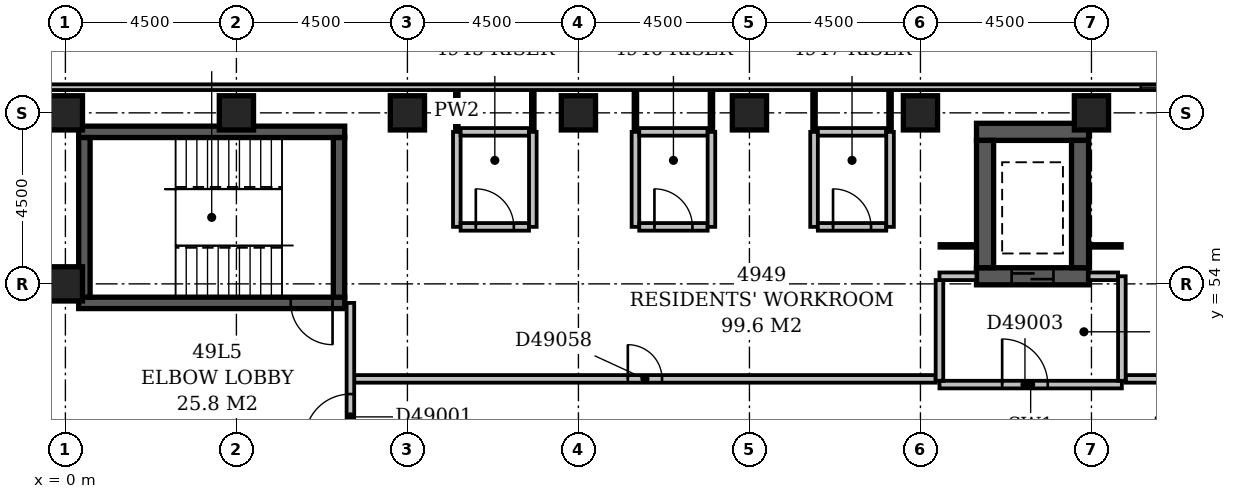
"""IFC4 building model, lengths in metres.
Left out: names, types, materials, properties, quantities, classifications, styles, units other than length and angle.
Written with IfcOpenShell. Run it as: python <this file> out.ifc"""

import sys

from ifc_helpers import new_model, si_unit, direction, frame, frame_2d, origin, origin_2d, place, context, subcontext, project, spatial, rectangle, extrude, element, fill, save


model = new_model("IFC4")
c1 = context("Model", 3, precision=1e-05, world=origin(), true_north=direction((0.0, 1.0)))
c2 = subcontext(c1, "Body", "Model", "MODEL_VIEW")
j1 = project(units=[si_unit("LENGTHUNIT", "METRE"), si_unit("PLANEANGLEUNIT", "RADIAN")], contexts=[c1])
p1 = place(None, origin())
s1 = spatial("IfcSite", under=j1, at=p1, CompositionType="ELEMENT")
p2 = place(p1, origin())
s2 = spatial("IfcBuilding", under=s1, at=p2, CompositionType="ELEMENT")
p3 = place(p2, frame((0.0, 0.0, 193.4)))
s3 = spatial("IfcBuildingStorey", under=s2, at=p3, CompositionType="ELEMENT", Elevation=193.4)
p4 = place(p3, frame((0.35, 53.5, -0.3), z_axis=(0.0, 0.0, 1.0), x_axis=(1.0, 0.0, 0.0)))
e1 = element("IfcWall", 1, at=p4, inside=s3, PredefinedType="SHEAR", context=c2, shape_type="SweptSolid", body=[
    extrude(rectangle(XDim=7.0, YDim=0.3, at=frame_2d((3.5, 0.0))), origin(), (0.0, 0.0, 1.0), 3.6),
])
p5 = place(p4, frame((5.58, 0.0, 0.3)))
e2 = element("IfcOpeningElement", 2, at=p5, cuts=e1, PredefinedType="OPENING", context=c2, shape_type="SweptSolid", body=[
    extrude(rectangle(XDim=1.1, YDim=2.1, at=frame_2d((0.55, 1.05))), frame((0.0, 0.162, 0.0), z_axis=(0.0, -1.0, 0.0), x_axis=(1.0, 0.0, 0.0)), (0.0, 0.0, 1.0), 0.324),
])
p6 = place(p3, frame((0.35, 58.0, -0.3), z_axis=(0.0, 0.0, 1.0), x_axis=(1.0, 0.0, 0.0)))
e3 = element("IfcWall", 3, at=p6, inside=s3, PredefinedType="SHEAR", context=c2, shape_type="SweptSolid", body=[
    extrude(rectangle(XDim=7.0, YDim=0.3, at=frame_2d((3.5, 0.0))), origin(), (0.0, 0.0, 1.0), 3.6),
])
for number, where, z_axis, x_axis in (
    (4, (0.5, 53.65, -0.3), (0.0, 0.0, 1.0), (0.0, 1.0, 0.0)),
    (5, (7.2, 53.65, -0.3), (0.0, 0.0, 1.0), (0.0, 1.0, 0.0)),
):
    element("IfcWall", number, at=place(p3, frame(where, z_axis=z_axis, x_axis=x_axis)), inside=s3, PredefinedType="SHEAR", context=c2, shape_type="SweptSolid", body=[
        extrude(rectangle(XDim=4.2, YDim=0.3, at=frame_2d((2.1, 0.0))), origin(), (0.0, 0.0, 1.0), 3.6),
    ])
p7 = place(p3, frame((23.975, 54.2, -0.3), z_axis=(0.0, 0.0, 1.0), x_axis=(1.0, 0.0, 0.0)))
e6 = element("IfcWall", 6, at=p7, inside=s3, PredefinedType="SHEAR", context=c2, shape_type="SweptSolid", body=[
    extrude(rectangle(XDim=2.95, YDim=0.45, at=frame_2d((1.475, 0.0))), origin(), (0.0, 0.0, 1.0), 3.6),
])
p8 = place(p7, frame((0.925, 0.0, 0.3)))
e7 = element("IfcOpeningElement", 7, at=p8, cuts=e6, PredefinedType="OPENING", context=c2, shape_type="SweptSolid", body=[
    extrude(rectangle(XDim=1.1, YDim=2.1, at=frame_2d((0.55, 1.05))), frame((0.0, 0.237, 0.0), z_axis=(0.0, -1.0, 0.0), x_axis=(1.0, 0.0, 0.0)), (0.0, 0.0, 1.0), 0.474),
])
p9 = place(p3, frame((23.975, 58.0, -0.3), z_axis=(0.0, 0.0, 1.0), x_axis=(1.0, 0.0, 0.0)))
e8 = element("IfcWall", 8, at=p9, inside=s3, PredefinedType="SHEAR", context=c2, shape_type="SweptSolid", body=[
    extrude(rectangle(XDim=2.95, YDim=0.45, at=frame_2d((1.475, 0.0))), origin(), (0.0, 0.0, 1.0), 3.6),
])
for number, where, z_axis, x_axis in (
    (9, (24.2, 54.425, -0.3), (0.0, 0.0, 1.0), (0.0, 1.0, 0.0)),
    (10, (26.7, 54.425, -0.3), (0.0, 0.0, 1.0), (0.0, 1.0, 0.0)),
):
    element("IfcWall", number, at=place(p3, frame(where, z_axis=z_axis, x_axis=x_axis)), inside=s3, PredefinedType="SHEAR", context=c2, shape_type="SweptSolid", body=[
        extrude(rectangle(XDim=3.35, YDim=0.45, at=frame_2d((1.675, 0.0))), origin(), (0.0, 0.0, 1.0), 3.6),
    ])
for number, where, z_axis, x_axis in (
    (11, (0.0, 54.0, -0.3), (0.0, 0.0, 1.0), (1.0, 0.0, 0.0)),
    (12, (0.0, 58.5, -0.3), (0.0, 0.0, 1.0), (1.0, 0.0, 0.0)),
    (13, (4.5, 58.5, -0.3), (0.0, 0.0, 1.0), (1.0, 0.0, 0.0)),
    (14, (9.0, 58.5, -0.3), (0.0, 0.0, 1.0), (1.0, 0.0, 0.0)),
    (15, (13.5, 58.5, -0.3), (0.0, 0.0, 1.0), (1.0, 0.0, 0.0)),
    (16, (18.0, 58.5, -0.3), (0.0, 0.0, 1.0), (1.0, 0.0, 0.0)),
    (17, (22.5, 58.5, -0.3), (0.0, 0.0, 1.0), (1.0, 0.0, 0.0)),
    (18, (27.0, 58.5, -0.3), (0.0, 0.0, 1.0), (1.0, 0.0, 0.0)),
):
    element("IfcColumn", number, at=place(p3, frame(where, z_axis=z_axis, x_axis=x_axis)), inside=s3, PredefinedType="COLUMN", context=c2, shape_type="SweptSolid", body=[
        extrude(rectangle(XDim=0.9, YDim=0.9, at=origin_2d()), origin(), (0.0, 0.0, 1.0), 3.6),
    ])
p10 = place(p3, frame((50.1, 59.175, 0.0), z_axis=(0.0, 0.0, 1.0), x_axis=(-1.0, 0.0, 0.0)))
e19 = element("IfcWall", 19, at=p10, inside=s3, PredefinedType="STANDARD", context=c2, shape_type="SweptSolid", body=[
    extrude(rectangle(XDim=50.85, YDim=0.15, at=frame_2d((25.425, 0.0))), origin(), (0.0, 0.0, 1.0), 2.7),
])
p11 = place(p10, frame((19.703, 0.0, 0.6)))
e20 = element("IfcOpeningElement", 20, at=p11, cuts=e19, PredefinedType="OPENING", context=c2, shape_type="SweptSolid", body=[
    extrude(rectangle(XDim=2.1, YDim=1.8, at=frame_2d((1.05, 0.9))), frame((0.0, 0.087, 0.0), z_axis=(0.0, -1.0, 0.0), x_axis=(1.0, 0.0, 0.0)), (0.0, 0.0, 1.0), 0.174),
])
p12 = place(p3, frame((23.0, 51.35, 0.0), z_axis=(0.0, 0.0, 1.0), x_axis=(1.0, 0.0, 0.0)))
e21 = element("IfcWall", 21, at=p12, inside=s3, PredefinedType="PARTITIONING", context=c2, shape_type="SweptSolid", body=[
    extrude(rectangle(XDim=4.8, YDim=0.2, at=frame_2d((2.4, 0.0))), origin(), (0.0, 0.0, 1.0), 3.3),
])
p13 = place(p12, frame((1.65, 0.0, 0.0)))
e22 = element("IfcOpeningElement", 22, at=p13, cuts=e21, PredefinedType="OPENING", context=c2, shape_type="SweptSolid", body=[
    extrude(rectangle(XDim=1.2, YDim=2.1, at=frame_2d((0.6, 1.05))), frame((0.0, 0.112, 0.0), z_axis=(0.0, -1.0, 0.0), x_axis=(1.0, 0.0, 0.0)), (0.0, 0.0, 1.0), 0.224),
])
p14 = place(p3, frame((27.8, 51.45, 0.0), z_axis=(0.0, 0.0, 1.0), x_axis=(0.0, 1.0, 0.0)))
e23 = element("IfcWall", 23, at=p14, inside=s3, PredefinedType="PARTITIONING", context=c2, shape_type="SweptSolid", body=[
    extrude(rectangle(XDim=2.75, YDim=0.2, at=frame_2d((1.375, 0.0))), origin(), (0.0, 0.0, 1.0), 3.3),
])
p15 = place(p3, frame((23.0, 54.2, 0.0), z_axis=(0.0, 0.0, 1.0), x_axis=(1.0, 0.0, 0.0)))
e24 = element("IfcWall", 24, at=p15, inside=s3, PredefinedType="PARTITIONING", context=c2, shape_type="SweptSolid", body=[
    extrude(rectangle(XDim=0.975, YDim=0.2, at=frame_2d((0.488, 0.0))), origin(), (0.0, 0.0, 1.0), 3.3),
])
p16 = place(p3, frame((26.925, 54.2, 0.0), z_axis=(0.0, 0.0, 1.0), x_axis=(1.0, 0.0, 0.0)))
e25 = element("IfcWall", 25, at=p16, inside=s3, PredefinedType="PARTITIONING", context=c2, shape_type="SweptSolid", body=[
    extrude(rectangle(XDim=0.775, YDim=0.2, at=frame_2d((0.387, 0.0))), origin(), (0.0, 0.0, 1.0), 3.3),
])
p17 = place(p3, frame((23.0, 51.45, 0.0), z_axis=(0.0, 0.0, 1.0), x_axis=(0.0, 1.0, 0.0)))
e26 = element("IfcWall", 26, at=p17, inside=s3, PredefinedType="PARTITIONING", context=c2, shape_type="SweptSolid", body=[
    extrude(rectangle(XDim=2.65, YDim=0.2, at=frame_2d((1.325, 0.0))), origin(), (0.0, 0.0, 1.0), 3.3),
])
p18 = place(p3, frame((7.5, 49.6, 0.0), z_axis=(0.0, 0.0, 1.0), x_axis=(0.0, 1.0, 0.0)))
e27 = element("IfcWall", 27, at=p18, inside=s3, PredefinedType="PARTITIONING", context=c2, shape_type="SweptSolid", body=[
    extrude(rectangle(XDim=3.9, YDim=0.2, at=frame_2d((1.95, 0.0))), origin(), (0.0, 0.0, 1.0), 3.3),
])
p19 = place(p18, frame((0.3, 0.0, 0.0)))
e28 = element("IfcOpeningElement", 28, at=p19, cuts=e27, PredefinedType="OPENING", context=c2, shape_type="SweptSolid", body=[
    extrude(rectangle(XDim=1.2, YDim=2.1, at=frame_2d((0.6, 1.05))), frame((0.0, 0.112, 0.0), z_axis=(0.0, -1.0, 0.0), x_axis=(1.0, 0.0, 0.0)), (0.0, 0.0, 1.0), 0.224),
])
p20 = place(p3, frame((7.6, 51.5, 0.0), z_axis=(0.0, 0.0, 1.0), x_axis=(1.0, 0.0, 0.0)))
e29 = element("IfcWall", 29, at=p20, inside=s3, PredefinedType="PARTITIONING", context=c2, shape_type="SweptSolid", body=[
    extrude(rectangle(XDim=15.3, YDim=0.2, at=frame_2d((7.65, 0.0))), origin(), (0.0, 0.0, 1.0), 3.3),
])
p21 = place(p20, frame((7.2, 0.0, 0.0)))
e30 = element("IfcOpeningElement", 30, at=p21, cuts=e29, PredefinedType="OPENING", context=c2, shape_type="SweptSolid", body=[
    extrude(rectangle(XDim=0.9, YDim=2.1, at=frame_2d((0.45, 1.05))), frame((0.0, 0.112, 0.0), z_axis=(0.0, -1.0, 0.0), x_axis=(1.0, 0.0, 0.0)), (0.0, 0.0, 1.0), 0.224),
])
p22 = place(p3, frame((27.9, 51.5, 0.0), z_axis=(0.0, 0.0, 1.0), x_axis=(1.0, 0.0, 0.0)))
e31 = element("IfcWall", 31, at=p22, inside=s3, PredefinedType="PARTITIONING", context=c2, shape_type="SweptSolid", body=[
    extrude(rectangle(XDim=9.3, YDim=0.2, at=frame_2d((4.65, 0.0))), origin(), (0.0, 0.0, 1.0), 3.3),
])
p23 = place(p22, frame((4.2, 0.0, 0.0)))
e32 = element("IfcOpeningElement", 32, at=p23, cuts=e31, PredefinedType="OPENING", context=c2, shape_type="SweptSolid", body=[
    extrude(rectangle(XDim=0.9, YDim=2.1, at=frame_2d((0.45, 1.05))), frame((0.0, 0.112, 0.0), z_axis=(0.0, -1.0, 0.0), x_axis=(1.0, 0.0, 0.0)), (0.0, 0.0, 1.0), 0.224),
])
p24 = place(p3, frame((23.0, 55.0, 0.0), z_axis=(0.0, 0.0, 1.0), x_axis=(1.0, 0.0, 0.0)))
e33 = element("IfcWall", 33, at=p24, inside=s3, PredefinedType="PARTITIONING", context=c2, shape_type="SweptSolid", body=[
    extrude(rectangle(XDim=0.975, YDim=0.1, at=frame_2d((0.488, 0.0))), origin(), (0.0, 0.0, 1.0), 3.3),
])
p25 = place(p3, frame((26.925, 55.0, 0.0), z_axis=(0.0, 0.0, 1.0), x_axis=(1.0, 0.0, 0.0)))
e34 = element("IfcWall", 34, at=p25, inside=s3, PredefinedType="PARTITIONING", context=c2, shape_type="SweptSolid", body=[
    extrude(rectangle(XDim=0.875, YDim=0.1, at=frame_2d((0.438, 0.0))), origin(), (0.0, 0.0, 1.0), 3.3),
])
p26 = place(p3, frame((10.3, 55.5, 0.0), z_axis=(0.0, 0.0, 1.0), x_axis=(0.0, 1.0, 0.0)))
e35 = element("IfcWall", 35, at=p26, inside=s3, PredefinedType="PARTITIONING", context=c2, shape_type="SweptSolid", body=[
    extrude(rectangle(XDim=2.5, YDim=0.2, at=frame_2d((1.25, 0.0))), origin(), (0.0, 0.0, 1.0), 3.3),
])
p27 = place(p3, frame((10.4, 55.5, 0.0), z_axis=(0.0, 0.0, 1.0), x_axis=(1.0, 0.0, 0.0)))
e36 = element("IfcWall", 36, at=p27, inside=s3, PredefinedType="PARTITIONING", context=c2, shape_type="SweptSolid", body=[
    extrude(rectangle(XDim=1.8, YDim=0.2, at=frame_2d((0.9, 0.0))), origin(), (0.0, 0.0, 1.0), 3.3),
])
p28 = place(p27, frame((0.4, 0.0, 0.0)))
e37 = element("IfcOpeningElement", 37, at=p28, cuts=e36, PredefinedType="OPENING", context=c2, shape_type="SweptSolid", body=[
    extrude(rectangle(XDim=1.0, YDim=2.1, at=frame_2d((0.5, 1.05))), frame((0.0, 0.112, 0.0), z_axis=(0.0, -1.0, 0.0), x_axis=(1.0, 0.0, 0.0)), (0.0, 0.0, 1.0), 0.224),
])
for number, where, z_axis, x_axis in (
    (38, (12.3, 55.5, 0.0), (0.0, 0.0, 1.0), (0.0, 1.0, 0.0)),
    (39, (15.0, 55.5, 0.0), (0.0, 0.0, 1.0), (0.0, 1.0, 0.0)),
):
    element("IfcWall", number, at=place(p3, frame(where, z_axis=z_axis, x_axis=x_axis)), inside=s3, PredefinedType="PARTITIONING", context=c2, shape_type="SweptSolid", body=[
        extrude(rectangle(XDim=2.5, YDim=0.2, at=frame_2d((1.25, 0.0))), origin(), (0.0, 0.0, 1.0), 3.3),
    ])
p29 = place(p3, frame((15.1, 55.5, 0.0), z_axis=(0.0, 0.0, 1.0), x_axis=(1.0, 0.0, 0.0)))
e40 = element("IfcWall", 40, at=p29, inside=s3, PredefinedType="PARTITIONING", context=c2, shape_type="SweptSolid", body=[
    extrude(rectangle(XDim=1.8, YDim=0.2, at=frame_2d((0.9, 0.0))), origin(), (0.0, 0.0, 1.0), 3.3),
])
p30 = place(p29, frame((0.4, 0.0, 0.0)))
e41 = element("IfcOpeningElement", 41, at=p30, cuts=e40, PredefinedType="OPENING", context=c2, shape_type="SweptSolid", body=[
    extrude(rectangle(XDim=1.0, YDim=2.1, at=frame_2d((0.5, 1.05))), frame((0.0, 0.112, 0.0), z_axis=(0.0, -1.0, 0.0), x_axis=(1.0, 0.0, 0.0)), (0.0, 0.0, 1.0), 0.224),
])
for number, where, z_axis, x_axis in (
    (42, (17.0, 55.5, 0.0), (0.0, 0.0, 1.0), (0.0, 1.0, 0.0)),
    (43, (19.7, 55.5, 0.0), (0.0, 0.0, 1.0), (0.0, 1.0, 0.0)),
):
    element("IfcWall", number, at=place(p3, frame(where, z_axis=z_axis, x_axis=x_axis)), inside=s3, PredefinedType="PARTITIONING", context=c2, shape_type="SweptSolid", body=[
        extrude(rectangle(XDim=2.5, YDim=0.2, at=frame_2d((1.25, 0.0))), origin(), (0.0, 0.0, 1.0), 3.3),
    ])
p31 = place(p3, frame((19.8, 55.5, 0.0), z_axis=(0.0, 0.0, 1.0), x_axis=(1.0, 0.0, 0.0)))
e44 = element("IfcWall", 44, at=p31, inside=s3, PredefinedType="PARTITIONING", context=c2, shape_type="SweptSolid", body=[
    extrude(rectangle(XDim=1.8, YDim=0.2, at=frame_2d((0.9, 0.0))), origin(), (0.0, 0.0, 1.0), 3.3),
])
p32 = place(p31, frame((0.4, 0.0, 0.0)))
e45 = element("IfcOpeningElement", 45, at=p32, cuts=e44, PredefinedType="OPENING", context=c2, shape_type="SweptSolid", body=[
    extrude(rectangle(XDim=1.0, YDim=2.1, at=frame_2d((0.5, 1.05))), frame((0.0, 0.112, 0.0), z_axis=(0.0, -1.0, 0.0), x_axis=(1.0, 0.0, 0.0)), (0.0, 0.0, 1.0), 0.224),
])
p33 = place(p3, frame((21.7, 55.5, 0.0), z_axis=(0.0, 0.0, 1.0), x_axis=(0.0, 1.0, 0.0)))
e46 = element("IfcWall", 46, at=p33, inside=s3, PredefinedType="PARTITIONING", context=c2, shape_type="SweptSolid", body=[
    extrude(rectangle(XDim=2.5, YDim=0.2, at=frame_2d((1.25, 0.0))), origin(), (0.0, 0.0, 1.0), 3.3),
])
p34 = place(p3, frame((10.3, 58.0, 0.0), z_axis=(0.0, 0.0, 1.0), x_axis=(0.0, 1.0, 0.0)))
e47 = element("IfcWall", 47, at=p34, inside=s3, PredefinedType="PARTITIONING", context=c2, shape_type="SweptSolid", body=[
    extrude(rectangle(XDim=1.1, YDim=0.1, at=frame_2d((0.55, 0.0))), origin(), (0.0, 0.0, 1.0), 3.3),
])
p35 = place(p3, frame((10.4, 58.0, 0.0), z_axis=(0.0, 0.0, 1.0), x_axis=(1.0, 0.0, 0.0)))
e48 = element("IfcWall", 48, at=p35, inside=s3, PredefinedType="PARTITIONING", context=c2, shape_type="SweptSolid", body=[
    extrude(rectangle(XDim=1.8, YDim=0.2, at=frame_2d((0.9, 0.0))), origin(), (0.0, 0.0, 1.0), 3.3),
])
for number, where, z_axis, x_axis in (
    (49, (12.3, 58.0, 0.0), (0.0, 0.0, 1.0), (0.0, 1.0, 0.0)),
    (50, (15.0, 58.0, 0.0), (0.0, 0.0, 1.0), (0.0, 1.0, 0.0)),
):
    element("IfcWall", number, at=place(p3, frame(where, z_axis=z_axis, x_axis=x_axis)), inside=s3, PredefinedType="PARTITIONING", context=c2, shape_type="SweptSolid", body=[
        extrude(rectangle(XDim=1.1, YDim=0.1, at=frame_2d((0.55, 0.0))), origin(), (0.0, 0.0, 1.0), 3.3),
    ])
p36 = place(p3, frame((15.1, 58.0, 0.0), z_axis=(0.0, 0.0, 1.0), x_axis=(1.0, 0.0, 0.0)))
e51 = element("IfcWall", 51, at=p36, inside=s3, PredefinedType="PARTITIONING", context=c2, shape_type="SweptSolid", body=[
    extrude(rectangle(XDim=1.8, YDim=0.2, at=frame_2d((0.9, 0.0))), origin(), (0.0, 0.0, 1.0), 3.3),
])
for number, where, z_axis, x_axis in (
    (52, (17.0, 58.0, 0.0), (0.0, 0.0, 1.0), (0.0, 1.0, 0.0)),
    (53, (19.7, 58.0, 0.0), (0.0, 0.0, 1.0), (0.0, 1.0, 0.0)),
):
    element("IfcWall", number, at=place(p3, frame(where, z_axis=z_axis, x_axis=x_axis)), inside=s3, PredefinedType="PARTITIONING", context=c2, shape_type="SweptSolid", body=[
        extrude(rectangle(XDim=1.1, YDim=0.1, at=frame_2d((0.55, 0.0))), origin(), (0.0, 0.0, 1.0), 3.3),
    ])
p37 = place(p3, frame((19.8, 58.0, 0.0), z_axis=(0.0, 0.0, 1.0), x_axis=(1.0, 0.0, 0.0)))
e54 = element("IfcWall", 54, at=p37, inside=s3, PredefinedType="PARTITIONING", context=c2, shape_type="SweptSolid", body=[
    extrude(rectangle(XDim=1.8, YDim=0.2, at=frame_2d((0.9, 0.0))), origin(), (0.0, 0.0, 1.0), 3.3),
])
p38 = place(p3, frame((21.7, 58.0, 0.0), z_axis=(0.0, 0.0, 1.0), x_axis=(0.0, 1.0, 0.0)))
e55 = element("IfcWall", 55, at=p38, inside=s3, PredefinedType="PARTITIONING", context=c2, shape_type="SweptSolid", body=[
    extrude(rectangle(XDim=1.1, YDim=0.1, at=frame_2d((0.55, 0.0))), origin(), (0.0, 0.0, 1.0), 3.3),
])
p39 = place(p11, origin())
e56 = element("IfcWindow", 56, at=p39, inside=s3, PartitioningType="SINGLE_PANEL", PredefinedType="WINDOW", context=c2, shape_type="SweptSolid", body=[
    extrude(rectangle(XDim=2.1, YDim=1.8, at=frame_2d((1.05, 0.9))), frame((0.0, 0.03, 0.0), z_axis=(0.0, -1.0, 0.0), x_axis=(1.0, 0.0, 0.0)), (0.0, 0.0, 1.0), 0.06),
])
fill(e20, e56)
p40 = place(p19, origin())
e57 = element("IfcDoor", 57, at=p40, inside=s3, OperationType="SINGLE_SWING_LEFT", PredefinedType="DOOR", context=c2, shape_type="SweptSolid", body=[
    extrude(rectangle(XDim=1.2, YDim=2.1, at=frame_2d((0.6, 1.05))), frame((0.0, 0.025, 0.0), z_axis=(0.0, -1.0, 0.0), x_axis=(1.0, 0.0, 0.0)), (0.0, 0.0, 1.0), 0.05),
])
fill(e28, e57)
p41 = place(p13, origin())
e58 = element("IfcDoor", 58, at=p41, inside=s3, OperationType="SINGLE_SWING_LEFT", PredefinedType="DOOR", context=c2, shape_type="SweptSolid", body=[
    extrude(rectangle(XDim=1.2, YDim=2.1, at=frame_2d((0.6, 1.05))), frame((0.0, 0.025, 0.0), z_axis=(0.0, -1.0, 0.0), x_axis=(1.0, 0.0, 0.0)), (0.0, 0.0, 1.0), 0.05),
])
fill(e22, e58)
p42 = place(p8, origin())
e59 = element("IfcDoor", 59, at=p42, inside=s3, OperationType="SLIDING_TO_LEFT", PredefinedType="DOOR", context=c2, shape_type="SweptSolid", body=[
    extrude(rectangle(XDim=1.1, YDim=2.1, at=frame_2d((0.55, 1.05))), frame((0.0, 0.025, 0.0), z_axis=(0.0, -1.0, 0.0), x_axis=(1.0, 0.0, 0.0)), (0.0, 0.0, 1.0), 0.05),
])
fill(e7, e59)
p43 = place(p5, origin())
e60 = element("IfcDoor", 60, at=p43, inside=s3, OperationType="SINGLE_SWING_RIGHT", PredefinedType="DOOR", context=c2, shape_type="SweptSolid", body=[
    extrude(rectangle(XDim=1.1, YDim=2.1, at=frame_2d((0.55, 1.05))), frame((0.0, 0.025, 0.0), z_axis=(0.0, -1.0, 0.0), x_axis=(1.0, 0.0, 0.0)), (0.0, 0.0, 1.0), 0.05),
])
fill(e2, e60)
p44 = place(p21, origin())
e61 = element("IfcDoor", 61, at=p44, inside=s3, OperationType="SINGLE_SWING_LEFT", PredefinedType="DOOR", context=c2, shape_type="SweptSolid", body=[
    extrude(rectangle(XDim=0.9, YDim=2.1, at=frame_2d((0.45, 1.05))), frame((0.0, 0.025, 0.0), z_axis=(0.0, -1.0, 0.0), x_axis=(1.0, 0.0, 0.0)), (0.0, 0.0, 1.0), 0.05),
])
fill(e30, e61)
p45 = place(p28, origin())
e62 = element("IfcDoor", 62, at=p45, inside=s3, OperationType="SINGLE_SWING_LEFT", PredefinedType="DOOR", context=c2, shape_type="SweptSolid", body=[
    extrude(rectangle(XDim=1.0, YDim=2.1, at=frame_2d((0.5, 1.05))), frame((0.0, 0.025, 0.0), z_axis=(0.0, -1.0, 0.0), x_axis=(1.0, 0.0, 0.0)), (0.0, 0.0, 1.0), 0.05),
])
fill(e37, e62)
p46 = place(p30, origin())
e63 = element("IfcDoor", 63, at=p46, inside=s3, OperationType="SINGLE_SWING_LEFT", PredefinedType="DOOR", context=c2, shape_type="SweptSolid", body=[
    extrude(rectangle(XDim=1.0, YDim=2.1, at=frame_2d((0.5, 1.05))), frame((0.0, 0.025, 0.0), z_axis=(0.0, -1.0, 0.0), x_axis=(1.0, 0.0, 0.0)), (0.0, 0.0, 1.0), 0.05),
])
fill(e41, e63)
p47 = place(p32, origin())
e64 = element("IfcDoor", 64, at=p47, inside=s3, OperationType="SINGLE_SWING_LEFT", PredefinedType="DOOR", context=c2, shape_type="SweptSolid", body=[
    extrude(rectangle(XDim=1.0, YDim=2.1, at=frame_2d((0.5, 1.05))), frame((0.0, 0.025, 0.0), z_axis=(0.0, -1.0, 0.0), x_axis=(1.0, 0.0, 0.0)), (0.0, 0.0, 1.0), 0.05),
])
fill(e45, e64)
save(model, sys.argv[1])
